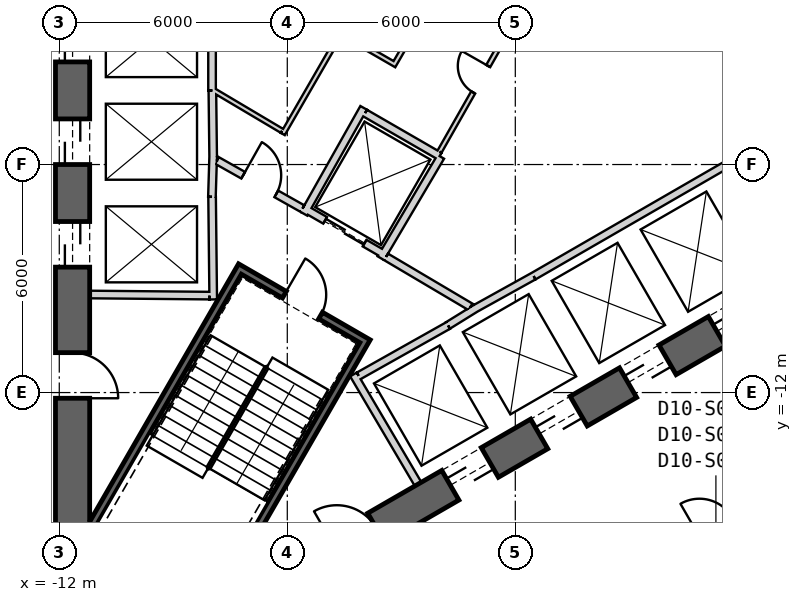
"""IFC4 building model, lengths in metres.
Left out: names, types, materials, properties, quantities, classifications, styles, units other than length and angle.
Written with IfcOpenShell. Run it as: python <this file> out.ifc"""

import sys

from ifc_helpers import new_model, si_unit, direction, frame, frame_2d, origin, place, context, subcontext, project, spatial, rectangle, extrude, element, fill, save


model = new_model("IFC4")
c1 = context("Model", 3, precision=1e-05, world=origin(), true_north=direction((0.0, 1.0)))
c2 = subcontext(c1, "Body", "Model", "MODEL_VIEW")
j1 = project(units=[si_unit("LENGTHUNIT", "METRE"), si_unit("PLANEANGLEUNIT", "RADIAN")], contexts=[c1])
p1 = place(None, origin())
s1 = spatial("IfcSite", under=j1, at=p1, CompositionType="ELEMENT")
p2 = place(p1, origin())
s2 = spatial("IfcBuilding", under=s1, at=p2, CompositionType="ELEMENT")
p3 = place(p2, frame((0.0, 0.0, 169.2)))
s3 = spatial("IfcBuildingStorey", under=s2, at=p3, CompositionType="ELEMENT", Elevation=169.2)
p4 = place(p3, frame((-11.65, 15.762, 0.0), z_axis=(0.0, 0.0, 1.0), x_axis=(0.0, -1.0, 0.0)))
e1 = element("IfcWall", 1, at=p4, inside=s3, PredefinedType="SHEAR", context=c2, shape_type="SweptSolid", body=[
    extrude(rectangle(XDim=31.523, YDim=0.9, at=frame_2d((15.762, 0.0))), origin(), (0.0, 0.0, 1.0), 4.0),
])
p5 = place(p4, frame((7.062, 0.0, 0.0)))
e2 = element("IfcOpeningElement", 2, at=p5, cuts=e1, PredefinedType="OPENING", context=c2, shape_type="SweptSolid", body=[
    extrude(rectangle(XDim=1.2, YDim=2.4, at=frame_2d((0.6, 1.2))), frame((0.0, 0.46, 0.0), z_axis=(0.0, -1.0, 0.0), x_axis=(1.0, 0.0, 0.0)), (0.0, 0.0, 1.0), 0.92),
])
p6 = place(p4, frame((9.762, 0.0, 0.0)))
e3 = element("IfcOpeningElement", 3, at=p6, cuts=e1, PredefinedType="OPENING", context=c2, shape_type="SweptSolid", body=[
    extrude(rectangle(XDim=1.2, YDim=2.4, at=frame_2d((0.6, 1.2))), frame((0.0, 0.46, 0.0), z_axis=(0.0, -1.0, 0.0), x_axis=(1.0, 0.0, 0.0)), (0.0, 0.0, 1.0), 0.92),
])
p7 = place(p4, frame((12.462, 0.0, 0.0)))
e4 = element("IfcOpeningElement", 4, at=p7, cuts=e1, PredefinedType="OPENING", context=c2, shape_type="SweptSolid", body=[
    extrude(rectangle(XDim=1.2, YDim=2.4, at=frame_2d((0.6, 1.2))), frame((0.0, 0.46, 0.0), z_axis=(0.0, -1.0, 0.0), x_axis=(1.0, 0.0, 0.0)), (0.0, 0.0, 1.0), 0.92),
])
p8 = place(p4, frame((15.162, 0.0, 0.0)))
e5 = element("IfcOpeningElement", 5, at=p8, cuts=e1, PredefinedType="OPENING", context=c2, shape_type="SweptSolid", body=[
    extrude(rectangle(XDim=1.2, YDim=2.4, at=frame_2d((0.6, 1.2))), frame((0.0, 0.46, 0.0), z_axis=(0.0, -1.0, 0.0), x_axis=(1.0, 0.0, 0.0)), (0.0, 0.0, 1.0), 0.92),
])
p9 = place(p4, frame((17.862, 0.0, 0.0)))
e6 = element("IfcOpeningElement", 6, at=p9, cuts=e1, PredefinedType="OPENING", context=c2, shape_type="SweptSolid", body=[
    extrude(rectangle(XDim=1.2, YDim=2.4, at=frame_2d((0.6, 1.2))), frame((0.0, 0.46, 0.0), z_axis=(0.0, -1.0, 0.0), x_axis=(1.0, 0.0, 0.0)), (0.0, 0.0, 1.0), 0.92),
])
p10 = place(p4, frame((20.562, 0.0, 0.0)))
e7 = element("IfcOpeningElement", 7, at=p10, cuts=e1, PredefinedType="OPENING", context=c2, shape_type="SweptSolid", body=[
    extrude(rectangle(XDim=1.2, YDim=2.4, at=frame_2d((0.6, 1.2))), frame((0.0, 0.46, 0.0), z_axis=(0.0, -1.0, 0.0), x_axis=(1.0, 0.0, 0.0)), (0.0, 0.0, 1.0), 0.92),
])
p11 = place(p4, frame((23.262, 0.0, 0.0)))
e8 = element("IfcOpeningElement", 8, at=p11, cuts=e1, PredefinedType="OPENING", context=c2, shape_type="SweptSolid", body=[
    extrude(rectangle(XDim=1.2, YDim=2.4, at=frame_2d((0.6, 1.2))), frame((0.0, 0.46, 0.0), z_axis=(0.0, -1.0, 0.0), x_axis=(1.0, 0.0, 0.0)), (0.0, 0.0, 1.0), 0.92),
])
p12 = place(p4, frame((3.612, 0.0, 0.0)))
e9 = element("IfcOpeningElement", 9, at=p12, cuts=e1, PredefinedType="OPENING", context=c2, shape_type="SweptSolid", body=[
    extrude(rectangle(XDim=1.2, YDim=2.4, at=frame_2d((0.6, 1.2))), frame((0.0, 0.46, 0.0), z_axis=(0.0, -1.0, 0.0), x_axis=(1.0, 0.0, 0.0)), (0.0, 0.0, 1.0), 0.92),
])
p13 = place(p4, frame((26.712, 0.0, 0.0)))
e10 = element("IfcOpeningElement", 10, at=p13, cuts=e1, PredefinedType="OPENING", context=c2, shape_type="SweptSolid", body=[
    extrude(rectangle(XDim=1.2, YDim=2.4, at=frame_2d((0.6, 1.2))), frame((0.0, 0.46, 0.0), z_axis=(0.0, -1.0, 0.0), x_axis=(1.0, 0.0, 0.0)), (0.0, 0.0, 1.0), 0.92),
])
p14 = place(p3, frame((-7.825, -17.97, 0.0), z_axis=(0.0, 0.0, 1.0), x_axis=(0.866028369851, 0.499994862586, 0.0)))
e11 = element("IfcWall", 11, at=p14, inside=s3, PredefinedType="SHEAR", context=c2, shape_type="SweptSolid", body=[
    extrude(rectangle(XDim=31.523, YDim=0.9, at=frame_2d((15.762, 0.0))), origin(), (0.0, 0.0, 1.0), 4.0),
])
p15 = place(p14, frame((7.062, 0.0, 0.0)))
e12 = element("IfcOpeningElement", 12, at=p15, cuts=e11, PredefinedType="OPENING", context=c2, shape_type="SweptSolid", body=[
    extrude(rectangle(XDim=1.2, YDim=2.4, at=frame_2d((0.6, 1.2))), frame((0.0, 0.46, 0.0), z_axis=(0.0, -1.0, 0.0), x_axis=(1.0, 0.0, 0.0)), (0.0, 0.0, 1.0), 0.92),
])
p16 = place(p14, frame((9.762, 0.0, 0.0)))
e13 = element("IfcOpeningElement", 13, at=p16, cuts=e11, PredefinedType="OPENING", context=c2, shape_type="SweptSolid", body=[
    extrude(rectangle(XDim=1.2, YDim=2.4, at=frame_2d((0.6, 1.2))), frame((0.0, 0.46, 0.0), z_axis=(0.0, -1.0, 0.0), x_axis=(1.0, 0.0, 0.0)), (0.0, 0.0, 1.0), 0.92),
])
p17 = place(p14, frame((12.462, 0.0, 0.0)))
e14 = element("IfcOpeningElement", 14, at=p17, cuts=e11, PredefinedType="OPENING", context=c2, shape_type="SweptSolid", body=[
    extrude(rectangle(XDim=1.2, YDim=2.4, at=frame_2d((0.6, 1.2))), frame((0.0, 0.46, 0.0), z_axis=(0.0, -1.0, 0.0), x_axis=(1.0, 0.0, 0.0)), (0.0, 0.0, 1.0), 0.92),
])
p18 = place(p14, frame((15.162, 0.0, 0.0)))
e15 = element("IfcOpeningElement", 15, at=p18, cuts=e11, PredefinedType="OPENING", context=c2, shape_type="SweptSolid", body=[
    extrude(rectangle(XDim=1.2, YDim=2.4, at=frame_2d((0.6, 1.2))), frame((0.0, 0.46, 0.0), z_axis=(0.0, -1.0, 0.0), x_axis=(1.0, 0.0, 0.0)), (0.0, 0.0, 1.0), 0.92),
])
p19 = place(p14, frame((17.862, 0.0, 0.0)))
e16 = element("IfcOpeningElement", 16, at=p19, cuts=e11, PredefinedType="OPENING", context=c2, shape_type="SweptSolid", body=[
    extrude(rectangle(XDim=1.2, YDim=2.4, at=frame_2d((0.6, 1.2))), frame((0.0, 0.46, 0.0), z_axis=(0.0, -1.0, 0.0), x_axis=(1.0, 0.0, 0.0)), (0.0, 0.0, 1.0), 0.92),
])
p20 = place(p14, frame((20.562, 0.0, 0.0)))
e17 = element("IfcOpeningElement", 17, at=p20, cuts=e11, PredefinedType="OPENING", context=c2, shape_type="SweptSolid", body=[
    extrude(rectangle(XDim=1.2, YDim=2.4, at=frame_2d((0.6, 1.2))), frame((0.0, 0.46, 0.0), z_axis=(0.0, -1.0, 0.0), x_axis=(1.0, 0.0, 0.0)), (0.0, 0.0, 1.0), 0.92),
])
p21 = place(p14, frame((26.712, 0.0, 0.0)))
e18 = element("IfcOpeningElement", 18, at=p21, cuts=e11, PredefinedType="OPENING", context=c2, shape_type="SweptSolid", body=[
    extrude(rectangle(XDim=1.2, YDim=2.4, at=frame_2d((0.6, 1.2))), frame((0.0, 0.46, 0.0), z_axis=(0.0, -1.0, 0.0), x_axis=(1.0, 0.0, 0.0)), (0.0, 0.0, 1.0), 0.92),
])
p22 = place(p14, frame((3.612, 0.0, 0.0)))
e19 = element("IfcOpeningElement", 19, at=p22, cuts=e11, PredefinedType="OPENING", context=c2, shape_type="SweptSolid", body=[
    extrude(rectangle(XDim=1.2, YDim=2.4, at=frame_2d((0.6, 1.2))), frame((0.0, 0.46, 0.0), z_axis=(0.0, -1.0, 0.0), x_axis=(1.0, 0.0, 0.0)), (0.0, 0.0, 1.0), 0.92),
])
p23 = place(p3, frame((-7.98, 4.05, 0.0), z_axis=(0.0, 0.0, 1.0), x_axis=(0.0, -1.0, 0.0)))
e20 = element("IfcWall", 20, at=p23, inside=s3, PredefinedType="PLUMBINGWALL", context=c2, shape_type="SweptSolid", body=[
    extrude(rectangle(XDim=8.1, YDim=0.2, at=frame_2d((4.05, 0.0))), origin(), (0.0, 0.0, 1.0), 3.7),
])
p24 = place(p3, frame((-7.95, -5.772, 0.0), z_axis=(0.0, 0.0, 1.0), x_axis=(-0.030803413295, -0.999525462272, 0.0)))
e21 = element("IfcWall", 21, at=p24, inside=s3, PredefinedType="PLUMBINGWALL", context=c2, shape_type="SweptSolid", body=[
    extrude(rectangle(XDim=1.078, YDim=0.2, at=frame_2d((0.539, 0.0))), origin(), (0.0, 0.0, 1.0), 3.7),
])
p25 = place(p3, frame((-7.971, -4.05, 0.0), z_axis=(0.0, 0.0, 1.0), x_axis=(0.012042535896, -0.999927486035, 0.0)))
e22 = element("IfcWall", 22, at=p25, inside=s3, PredefinedType="PLUMBINGWALL", context=c2, shape_type="SweptSolid", body=[
    extrude(rectangle(XDim=1.845, YDim=0.2, at=frame_2d((0.922, 0.0))), origin(), (0.0, 0.0, 1.0), 3.7),
])
p26 = place(p3, frame((-7.979, -6.85, 0.0), z_axis=(0.0, 0.0, 1.0), x_axis=(0.011121475088, -0.999938154483, 0.0)))
e23 = element("IfcWall", 23, at=p26, inside=s3, PredefinedType="PLUMBINGWALL", context=c2, shape_type="SweptSolid", body=[
    extrude(rectangle(XDim=2.7, YDim=0.2, at=frame_2d((1.35, 0.0))), origin(), (0.0, 0.0, 1.0), 3.7),
])
p27 = place(p3, frame((-8.05, -9.449, 0.0), z_axis=(0.0, 0.0, 1.0), x_axis=(-0.999957467379, 0.009222983926, 0.0)))
e24 = element("IfcWall", 24, at=p27, inside=s3, PredefinedType="PLUMBINGWALL", context=c2, shape_type="SweptSolid", body=[
    extrude(rectangle(XDim=3.15, YDim=0.2, at=frame_2d((1.575, 0.0))), origin(), (0.0, 0.0, 1.0), 3.7),
])
p28 = place(p3, frame((0.483, -8.936, 0.0), z_axis=(0.0, 0.0, 1.0), x_axis=(0.866030989016, 0.499990325971, 0.0)))
e25 = element("IfcWall", 25, at=p28, inside=s3, PredefinedType="PLUMBINGWALL", context=c2, shape_type="SweptSolid", body=[
    extrude(rectangle(XDim=8.1, YDim=0.2, at=frame_2d((4.05, 0.0))), origin(), (0.0, 0.0, 1.0), 3.7),
])
p29 = place(p3, frame((-2.558, -14.409, 0.0), z_axis=(0.0, 0.0, 1.0), x_axis=(-0.507997497166, 0.861358544901, 0.0)))
e26 = element("IfcWall", 26, at=p29, inside=s3, PredefinedType="PLUMBINGWALL", context=c2, shape_type="SweptSolid", body=[
    extrude(rectangle(XDim=3.35, YDim=0.2, at=frame_2d((1.675, 0.0))), origin(), (0.0, 0.0, 1.0), 3.7),
])
p30 = place(p3, frame((-1.769, -10.237, 0.0), z_axis=(0.0, 0.0, 1.0), x_axis=(-0.871534483978, -0.490334215854, 0.0)))
e27 = element("IfcWall", 27, at=p30, inside=s3, PredefinedType="PLUMBINGWALL", context=c2, shape_type="SweptSolid", body=[
    extrude(rectangle(XDim=2.7, YDim=0.2, at=frame_2d((1.35, 0.0))), origin(), (0.0, 0.0, 1.0), 3.7),
])
p31 = place(p3, frame((-1.024, -9.771, 0.0), z_axis=(0.0, 0.0, 1.0), x_axis=(-0.850348075135, -0.526220629693, 0.0)))
e28 = element("IfcWall", 28, at=p31, inside=s3, PredefinedType="PLUMBINGWALL", context=c2, shape_type="SweptSolid", body=[
    extrude(rectangle(XDim=0.878, YDim=0.2, at=frame_2d((0.439, 0.0))), origin(), (0.0, 0.0, 1.0), 3.7),
])
p32 = place(p3, frame((-1.13, -9.831, 0.0), z_axis=(0.0, 0.0, 1.0), x_axis=(0.874269620932, 0.485440655401, 0.0)))
e29 = element("IfcWall", 29, at=p32, inside=s3, PredefinedType="PLUMBINGWALL", context=c2, shape_type="SweptSolid", body=[
    extrude(rectangle(XDim=1.845, YDim=0.2, at=frame_2d((0.922, 0.0))), origin(), (0.0, 0.0, 1.0), 3.7),
])
p33 = place(p3, frame((-3.905, -10.563, -0.3), z_axis=(0.0, 0.0, 1.0), x_axis=(-0.500012932018, -0.866017937352, 0.0)))
e30 = element("IfcWall", 30, at=p33, inside=s3, PredefinedType="SHEAR", context=c2, shape_type="SweptSolid", body=[
    extrude(rectangle(XDim=8.1, YDim=0.2, at=frame_2d((4.05, 0.0))), origin(), (0.0, 0.0, 1.0), 4.0),
])
p34 = place(p3, frame((-7.196, -8.663, -0.3), z_axis=(0.0, 0.0, 1.0), x_axis=(-0.499997992926, -0.866026562566, 0.0)))
e31 = element("IfcWall", 31, at=p34, inside=s3, PredefinedType="SHEAR", context=c2, shape_type="SweptSolid", body=[
    extrude(rectangle(XDim=7.9, YDim=0.2, at=frame_2d((3.95, 0.0))), origin(), (0.0, 0.0, 1.0), 4.0),
])
p35 = place(p3, frame((-4.041, -10.599, -0.3), z_axis=(0.0, 0.0, 1.0), x_axis=(-0.866047807691, 0.499961193289, 0.0)))
e32 = element("IfcWall", 32, at=p35, inside=s3, PredefinedType="SHEAR", context=c2, shape_type="SweptSolid", body=[
    extrude(rectangle(XDim=3.6, YDim=0.2, at=frame_2d((1.8, 0.0))), origin(), (0.0, 0.0, 1.0), 4.0),
])
p36 = place(p35, frame((1.25, 0.0, 0.3)))
e33 = element("IfcOpeningElement", 33, at=p36, cuts=e32, PredefinedType="OPENING", context=c2, shape_type="SweptSolid", body=[
    extrude(rectangle(XDim=1.1, YDim=2.1, at=frame_2d((0.55, 1.05))), frame((0.0, 0.11, 0.0), z_axis=(0.0, -1.0, 0.0), x_axis=(1.0, 0.0, 0.0)), (0.0, 0.0, 1.0), 0.22),
])
p37 = place(p3, frame((-3.446, -8.368, 0.0), z_axis=(0.0, 0.0, 1.0), x_axis=(-0.866024647952, 0.500001309137, 0.0)))
e34 = element("IfcWall", 34, at=p37, inside=s3, PredefinedType="PLUMBINGWALL", context=c2, shape_type="SweptSolid", body=[
    extrude(rectangle(XDim=2.4, YDim=0.2, at=frame_2d((1.2, 0.0))), origin(), (0.0, 0.0, 1.0), 3.7),
])
p38 = place(p37, frame((0.6, 0.0, 0.0)))
e35 = element("IfcOpeningElement", 35, at=p38, cuts=e34, PredefinedType="OPENING", context=c2, shape_type="SweptSolid", body=[
    extrude(rectangle(XDim=1.2, YDim=2.4, at=frame_2d((0.6, 1.2))), frame((0.0, 0.11, 0.0), z_axis=(0.0, -1.0, 0.0), x_axis=(1.0, 0.0, 0.0)), (0.0, 0.0, 1.0), 0.22),
])
p39 = place(p3, frame((-1.961, -5.796, 0.0), z_axis=(0.0, 0.0, 1.0), x_axis=(-0.508647062354, -0.860975125052, 0.0)))
e36 = element("IfcWall", 36, at=p39, inside=s3, PredefinedType="PLUMBINGWALL", context=c2, shape_type="SweptSolid", body=[
    extrude(rectangle(XDim=3.1, YDim=0.2, at=frame_2d((1.55, 0.0))), origin(), (0.0, 0.0, 1.0), 3.7),
])
p40 = place(p3, frame((-3.99, -4.509, 0.0), z_axis=(0.0, 0.0, 1.0), x_axis=(-0.491358283181, -0.870957540612, 0.0)))
e37 = element("IfcWall", 37, at=p40, inside=s3, PredefinedType="PLUMBINGWALL", context=c2, shape_type="SweptSolid", body=[
    extrude(rectangle(XDim=3.2, YDim=0.2, at=frame_2d((1.6, 0.0))), origin(), (0.0, 0.0, 1.0), 3.7),
])
p41 = place(p3, frame((-3.953, -4.646, 0.0), z_axis=(0.0, 0.0, 1.0), x_axis=(0.866065302921, -0.4999308863, 0.0)))
e38 = element("IfcWall", 38, at=p41, inside=s3, PredefinedType="PLUMBINGWALL", context=c2, shape_type="SweptSolid", body=[
    extrude(rectangle(XDim=2.264, YDim=0.2, at=frame_2d((1.132, 0.0))), origin(), (0.0, 0.0, 1.0), 3.7),
])
p42 = place(p3, frame((-3.401, -8.43, 0.0), z_axis=(0.0, 0.0, 1.0), x_axis=(0.860615607571, -0.509255118781, 0.0)))
e39 = element("IfcWall", 39, at=p42, inside=s3, PredefinedType="PARTITIONING", context=c2, shape_type="SweptSolid", body=[
    extrude(rectangle(XDim=2.581, YDim=0.2, at=frame_2d((1.29, 0.0))), origin(), (0.0, 0.0, 1.0), 3.7),
])
p43 = place(p3, frame((-7.849, -5.894, 0.0), z_axis=(0.0, 0.0, 1.0), x_axis=(0.871363259478, -0.490638431059, 0.0)))
e40 = element("IfcWall", 40, at=p43, inside=s3, PredefinedType="PARTITIONING", context=c2, shape_type="SweptSolid", body=[
    extrude(rectangle(XDim=2.581, YDim=0.2, at=frame_2d((1.291, 0.0))), origin(), (0.0, 0.0, 1.0), 3.7),
])
p44 = place(p43, frame((0.791, 0.0, 0.0)))
e41 = element("IfcOpeningElement", 41, at=p44, cuts=e40, PredefinedType="OPENING", context=c2, shape_type="SweptSolid", body=[
    extrude(rectangle(XDim=1.0, YDim=2.1, at=frame_2d((0.5, 1.05))), frame((0.0, 0.11, 0.0), z_axis=(0.0, -1.0, 0.0), x_axis=(1.0, 0.0, 0.0)), (0.0, 0.0, 1.0), 0.22),
])
p45 = place(p3, frame((0.224, -1.761, 0.0), z_axis=(0.0, 0.0, 1.0), x_axis=(-0.494327216836, -0.869275907118, 0.0)))
e42 = element("IfcWall", 42, at=p45, inside=s3, PredefinedType="PARTITIONING", context=c2, shape_type="SweptSolid", body=[
    extrude(rectangle(XDim=4.487, YDim=0.12, at=frame_2d((2.244, 0.0))), origin(), (0.0, 0.0, 1.0), 3.7),
])
p46 = place(p45, frame((1.895, 0.0, 0.0)))
e43 = element("IfcOpeningElement", 43, at=p46, cuts=e42, PredefinedType="OPENING", context=c2, shape_type="SweptSolid", body=[
    extrude(rectangle(XDim=0.8, YDim=2.1, at=frame_2d((0.4, 1.05))), frame((0.0, 0.07, 0.0), z_axis=(0.0, -1.0, 0.0), x_axis=(1.0, 0.0, 0.0)), (0.0, 0.0, 1.0), 0.14),
])
p47 = place(p3, frame((-3.211, -3.412, 0.0), z_axis=(0.0, 0.0, 1.0), x_axis=(0.499983190554, 0.866035108505, 0.0)))
e44 = element("IfcWall", 44, at=p47, inside=s3, PredefinedType="PARTITIONING", context=c2, shape_type="SweptSolid", body=[
    extrude(rectangle(XDim=3.026, YDim=0.12, at=frame_2d((1.513, 0.0))), origin(), (0.0, 0.0, 1.0), 3.7),
])
p48 = place(p47, frame((1.143, 0.0, 0.0)))
e45 = element("IfcOpeningElement", 45, at=p48, cuts=e44, PredefinedType="OPENING", context=c2, shape_type="SweptSolid", body=[
    extrude(rectangle(XDim=0.8, YDim=2.1, at=frame_2d((0.4, 1.05))), frame((0.0, 0.07, 0.0), z_axis=(0.0, -1.0, 0.0), x_axis=(1.0, 0.0, 0.0)), (0.0, 0.0, 1.0), 0.14),
])
p49 = place(p3, frame((-4.64, -2.517, 0.0), z_axis=(0.0, 0.0, 1.0), x_axis=(0.866015446554, -0.500017246033, 0.0)))
e46 = element("IfcWall", 46, at=p49, inside=s3, PredefinedType="PARTITIONING", context=c2, shape_type="SweptSolid", body=[
    extrude(rectangle(XDim=1.625, YDim=0.12, at=frame_2d((0.812, 0.0))), origin(), (0.0, 0.0, 1.0), 3.7),
])
p50 = place(p3, frame((-6.118, -5.197, 0.0), z_axis=(0.0, 0.0, 1.0), x_axis=(0.499990139034, 0.866031096941, 0.0)))
e47 = element("IfcWall", 47, at=p50, inside=s3, PredefinedType="PARTITIONING", context=c2, shape_type="SweptSolid", body=[
    extrude(rectangle(XDim=3.0, YDim=0.12, at=frame_2d((1.5, 0.0))), origin(), (0.0, 0.0, 1.0), 3.7),
])
p51 = place(p3, frame((-7.95, -4.041, 0.0), z_axis=(0.0, 0.0, 1.0), x_axis=(0.860112457103, -0.510104461004, 0.0)))
e48 = element("IfcWall", 48, at=p51, inside=s3, PredefinedType="PARTITIONING", context=c2, shape_type="SweptSolid", body=[
    extrude(rectangle(XDim=2.104, YDim=0.12, at=frame_2d((1.052, 0.0))), origin(), (0.0, 0.0, 1.0), 3.7),
])
p52 = place(p3, frame((4.283, -16.118, 0.0), z_axis=(0.0, 0.0, 1.0), x_axis=(0.866053019151, 0.499952165731, 0.0)))
e49 = element("IfcWall", 49, at=p52, inside=s3, PredefinedType="PARTITIONING", context=c2, shape_type="SweptSolid", body=[
    extrude(rectangle(XDim=2.3, YDim=0.12, at=frame_2d((1.15, 0.0))), origin(), (0.0, 0.0, 1.0), 3.7),
])
p53 = place(p52, frame((0.65, 0.0, 0.0)))
e50 = element("IfcOpeningElement", 50, at=p53, cuts=e49, PredefinedType="OPENING", context=c2, shape_type="SweptSolid", body=[
    extrude(rectangle(XDim=1.0, YDim=2.1, at=frame_2d((0.5, 1.05))), frame((0.0, 0.07, 0.0), z_axis=(0.0, -1.0, 0.0), x_axis=(1.0, 0.0, 0.0)), (0.0, 0.0, 1.0), 0.14),
])
p54 = place(p36, origin())
e51 = element("IfcDoor", 51, at=p54, inside=s3, OperationType="SINGLE_SWING_RIGHT", PredefinedType="USERDEFINED", context=c2, shape_type="SweptSolid", body=[
    extrude(rectangle(XDim=1.1, YDim=2.1, at=frame_2d((0.55, 1.05))), frame((0.0, 0.025, 0.0), z_axis=(0.0, -1.0, 0.0), x_axis=(1.0, 0.0, 0.0)), (0.0, 0.0, 1.0), 0.05),
])
fill(e33, e51)
p55 = place(p44, origin())
e52 = element("IfcDoor", 52, at=p55, inside=s3, OperationType="SINGLE_SWING_LEFT", PredefinedType="USERDEFINED", context=c2, shape_type="SweptSolid", body=[
    extrude(rectangle(XDim=1.0, YDim=2.1, at=frame_2d((0.5, 1.05))), frame((0.0, 0.025, 0.0), z_axis=(0.0, -1.0, 0.0), x_axis=(1.0, 0.0, 0.0)), (0.0, 0.0, 1.0), 0.05),
])
fill(e41, e52)
p56 = place(p38, origin())
e53 = element("IfcDoor", 53, at=p56, inside=s3, OperationType="SLIDING_TO_LEFT", PredefinedType="USERDEFINED", context=c2, shape_type="SweptSolid", body=[
    extrude(rectangle(XDim=1.2, YDim=2.4, at=frame_2d((0.6, 1.2))), frame((0.0, 0.025, 0.0), z_axis=(0.0, -1.0, 0.0), x_axis=(1.0, 0.0, 0.0)), (0.0, 0.0, 1.0), 0.05),
])
fill(e35, e53)
p57 = place(p46, origin())
e54 = element("IfcDoor", 54, at=p57, inside=s3, OperationType="SINGLE_SWING_LEFT", PredefinedType="USERDEFINED", context=c2, shape_type="SweptSolid", body=[
    extrude(rectangle(XDim=0.8, YDim=2.1, at=frame_2d((0.4, 1.05))), frame((0.0, 0.025, 0.0), z_axis=(0.0, -1.0, 0.0), x_axis=(1.0, 0.0, 0.0)), (0.0, 0.0, 1.0), 0.05),
])
fill(e43, e54)
p58 = place(p53, origin())
e55 = element("IfcDoor", 55, at=p58, inside=s3, OperationType="SINGLE_SWING_RIGHT", PredefinedType="NOTDEFINED", context=c2, shape_type="SweptSolid", body=[
    extrude(rectangle(XDim=1.0, YDim=2.1, at=frame_2d((0.5, 1.05))), frame((0.0, 0.025, 0.0), z_axis=(0.0, -1.0, 0.0), x_axis=(1.0, 0.0, 0.0)), (0.0, 0.0, 1.0), 0.05),
])
fill(e50, e55)
p59 = place(p9, origin())
e56 = element("IfcDoor", 56, at=p59, inside=s3, OperationType="SLIDING_TO_LEFT", PredefinedType="USERDEFINED", context=c2, shape_type="SweptSolid", body=[
    extrude(rectangle(XDim=1.2, YDim=2.4, at=frame_2d((0.6, 1.2))), frame((0.0, 0.025, 0.0), z_axis=(0.0, -1.0, 0.0), x_axis=(1.0, 0.0, 0.0)), (0.0, 0.0, 1.0), 0.05),
])
fill(e6, e56)
p60 = place(p10, origin())
e57 = element("IfcDoor", 57, at=p60, inside=s3, OperationType="SLIDING_TO_LEFT", PredefinedType="USERDEFINED", context=c2, shape_type="SweptSolid", body=[
    extrude(rectangle(XDim=1.2, YDim=2.4, at=frame_2d((0.6, 1.2))), frame((0.0, 0.025, 0.0), z_axis=(0.0, -1.0, 0.0), x_axis=(1.0, 0.0, 0.0)), (0.0, 0.0, 1.0), 0.05),
])
fill(e7, e57)
p61 = place(p11, origin())
e58 = element("IfcDoor", 58, at=p61, inside=s3, OperationType="SLIDING_TO_LEFT", PredefinedType="USERDEFINED", context=c2, shape_type="SweptSolid", body=[
    extrude(rectangle(XDim=1.2, YDim=2.4, at=frame_2d((0.6, 1.2))), frame((0.0, 0.025, 0.0), z_axis=(0.0, -1.0, 0.0), x_axis=(1.0, 0.0, 0.0)), (0.0, 0.0, 1.0), 0.05),
])
fill(e8, e58)
p62 = place(p15, origin())
e59 = element("IfcDoor", 59, at=p62, inside=s3, OperationType="SLIDING_TO_LEFT", PredefinedType="USERDEFINED", context=c2, shape_type="SweptSolid", body=[
    extrude(rectangle(XDim=1.2, YDim=2.4, at=frame_2d((0.6, 1.2))), frame((0.0, 0.025, 0.0), z_axis=(0.0, -1.0, 0.0), x_axis=(1.0, 0.0, 0.0)), (0.0, 0.0, 1.0), 0.05),
])
fill(e12, e59)
p63 = place(p16, origin())
e60 = element("IfcDoor", 60, at=p63, inside=s3, OperationType="SLIDING_TO_LEFT", PredefinedType="USERDEFINED", context=c2, shape_type="SweptSolid", body=[
    extrude(rectangle(XDim=1.2, YDim=2.4, at=frame_2d((0.6, 1.2))), frame((0.0, 0.025, 0.0), z_axis=(0.0, -1.0, 0.0), x_axis=(1.0, 0.0, 0.0)), (0.0, 0.0, 1.0), 0.05),
])
fill(e13, e60)
p64 = place(p17, origin())
e61 = element("IfcDoor", 61, at=p64, inside=s3, OperationType="SLIDING_TO_LEFT", PredefinedType="USERDEFINED", context=c2, shape_type="SweptSolid", body=[
    extrude(rectangle(XDim=1.2, YDim=2.4, at=frame_2d((0.6, 1.2))), frame((0.0, 0.025, 0.0), z_axis=(0.0, -1.0, 0.0), x_axis=(1.0, 0.0, 0.0)), (0.0, 0.0, 1.0), 0.05),
])
fill(e14, e61)
p65 = place(p18, origin())
e62 = element("IfcDoor", 62, at=p65, inside=s3, OperationType="SLIDING_TO_LEFT", PredefinedType="USERDEFINED", context=c2, shape_type="SweptSolid", body=[
    extrude(rectangle(XDim=1.2, YDim=2.4, at=frame_2d((0.6, 1.2))), frame((0.0, 0.025, 0.0), z_axis=(0.0, -1.0, 0.0), x_axis=(1.0, 0.0, 0.0)), (0.0, 0.0, 1.0), 0.05),
])
fill(e15, e62)
p66 = place(p13, origin())
e63 = element("IfcDoor", 63, at=p66, inside=s3, OperationType="SINGLE_SWING_RIGHT", PredefinedType="USERDEFINED", context=c2, shape_type="SweptSolid", body=[
    extrude(rectangle(XDim=1.2, YDim=2.4, at=frame_2d((0.6, 1.2))), frame((0.0, 0.025, 0.0), z_axis=(0.0, -1.0, 0.0), x_axis=(1.0, 0.0, 0.0)), (0.0, 0.0, 1.0), 0.05),
])
fill(e10, e63)
save(model, sys.argv[1])
